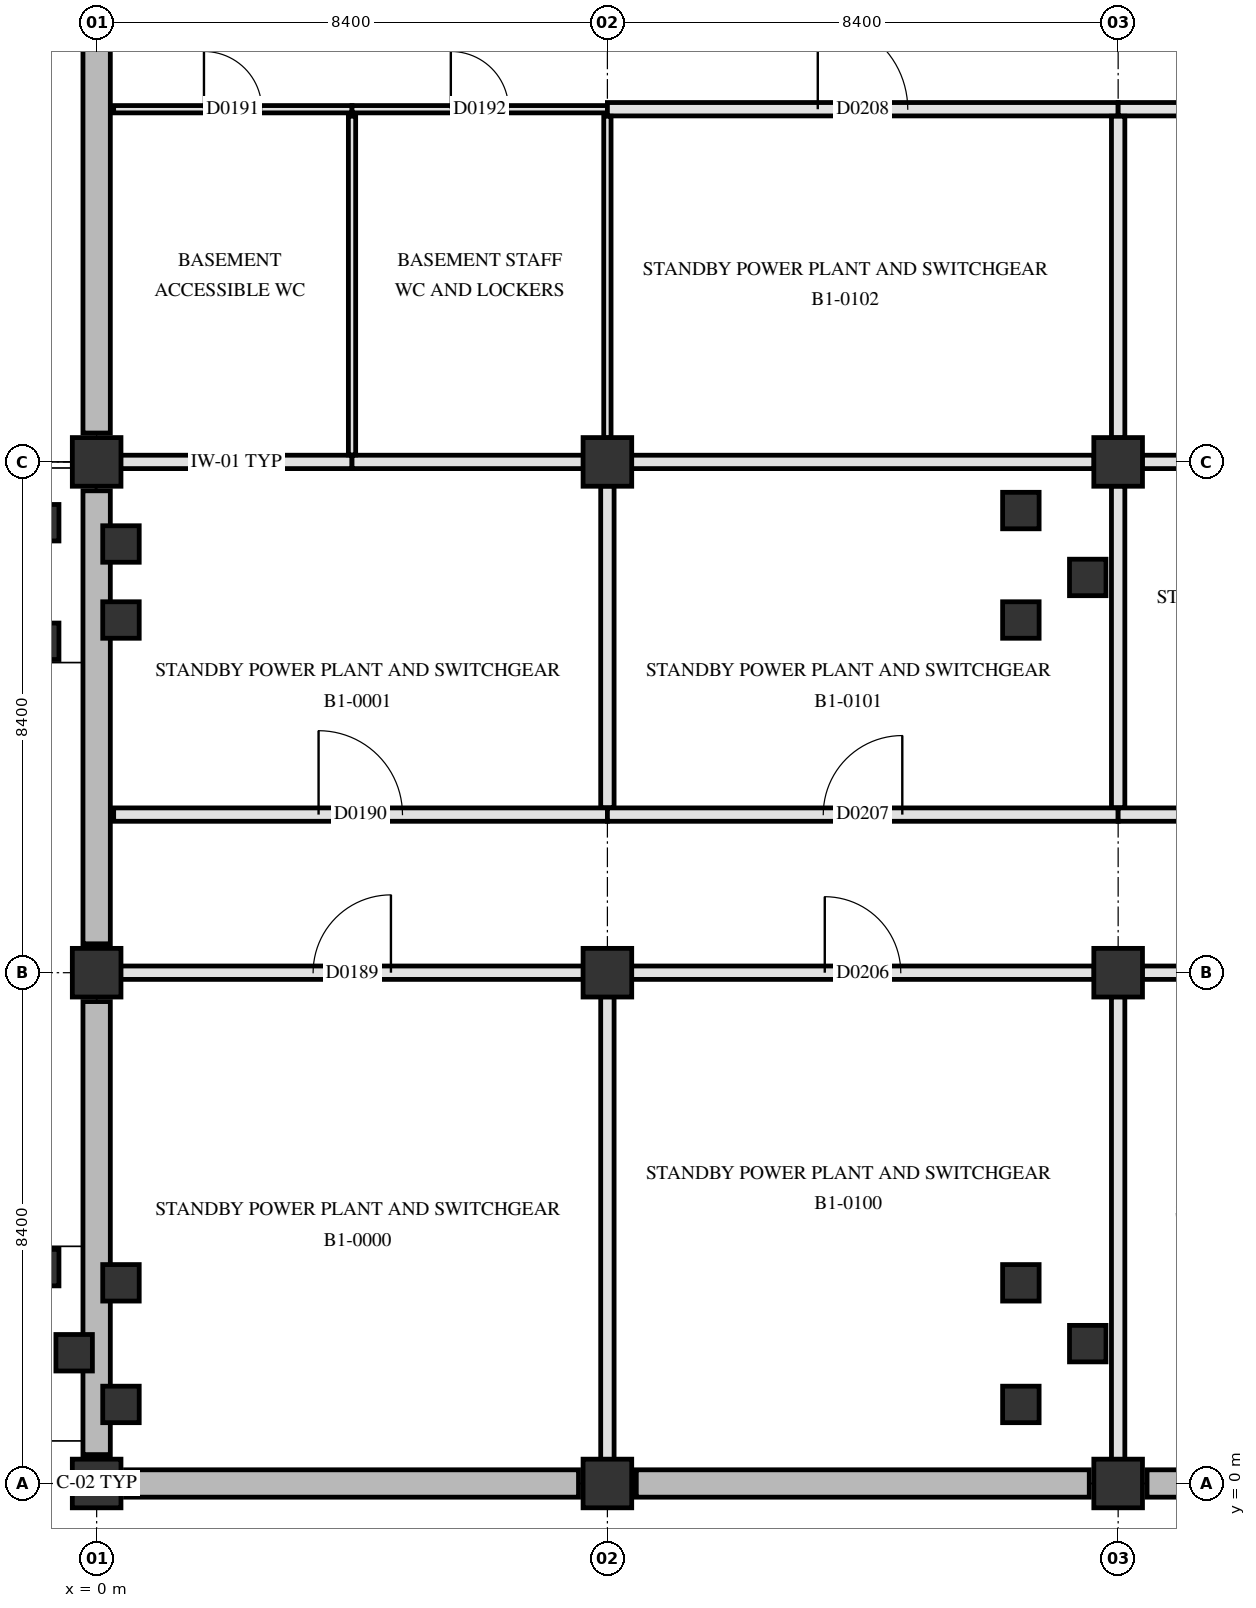
"""IFC4 building model, lengths in metres.
Left out: names, types, materials, properties, quantities, classifications, styles, units other than length and angle.
Written with IfcOpenShell. Run it as: python <this file> out.ifc"""

import sys

from ifc_helpers import new_model, si_unit, direction, frame, frame_2d, origin, origin_2d, place, context, subcontext, project, spatial, rectangle, extrude, element, fill, save


model = new_model("IFC4")
c1 = context("Model", 3, precision=1e-05, world=origin(), true_north=direction((0.0, 1.0)))
c2 = subcontext(c1, "Body", "Model", "MODEL_VIEW")
j1 = project(units=[si_unit("LENGTHUNIT", "METRE"), si_unit("PLANEANGLEUNIT", "RADIAN")], contexts=[c1])
p1 = place(None, origin())
s1 = spatial("IfcSite", under=j1, at=p1, CompositionType="ELEMENT")
p2 = place(p1, origin())
s2 = spatial("IfcBuilding", under=s1, at=p2, CompositionType="ELEMENT")
p3 = place(p2, frame((0.0, 0.0, -5.4)))
s3 = spatial("IfcBuildingStorey", under=s2, at=p3, CompositionType="ELEMENT", Elevation=-5.4)
for number, where, z_axis, x_axis in (
    (1, (0.0, 0.0, 0.0), (0.0, 0.0, 1.0), (1.0, 0.0, 0.0)),
    (2, (0.0, 8.4, 0.0), (0.0, 0.0, 1.0), (1.0, 0.0, 0.0)),
    (3, (0.0, 16.8, 0.0), (0.0, 0.0, 1.0), (1.0, 0.0, 0.0)),
    (4, (8.4, 0.0, 0.0), (0.0, 0.0, 1.0), (1.0, 0.0, 0.0)),
    (5, (8.4, 8.4, 0.0), (0.0, 0.0, 1.0), (1.0, 0.0, 0.0)),
    (6, (8.4, 16.8, 0.0), (0.0, 0.0, 1.0), (1.0, 0.0, 0.0)),
    (7, (16.8, 0.0, 0.0), (0.0, 0.0, 1.0), (1.0, 0.0, 0.0)),
    (8, (16.8, 8.4, 0.0), (0.0, 0.0, 1.0), (1.0, 0.0, 0.0)),
    (9, (16.8, 16.8, 0.0), (0.0, 0.0, 1.0), (1.0, 0.0, 0.0)),
):
    element("IfcColumn", number, at=place(p3, frame(where, z_axis=z_axis, x_axis=x_axis)), inside=s3, PredefinedType="COLUMN", context=c2, shape_type="SweptSolid", body=[
        extrude(rectangle(XDim=0.8, YDim=0.8, at=origin_2d()), origin(), (0.0, 0.0, 1.0), 5.4),
    ])
p4 = place(p3, frame((24.725, 0.0, 0.0), z_axis=(0.0, 0.0, 1.0), x_axis=(-1.0, 0.0, 0.0)))
e10 = element("IfcWall", 10, at=p4, inside=s3, PredefinedType="SOLIDWALL", context=c2, shape_type="SweptSolid", body=[
    extrude(rectangle(XDim=7.45, YDim=0.45, at=frame_2d((3.725, 0.0))), origin(), (0.0, 0.0, 1.0), 5.08),
])
for number, where, z_axis, x_axis in (
    (11, (16.325, 0.0, 0.0), (0.0, 0.0, 1.0), (-1.0, 0.0, 0.0)),
    (12, (7.925, 0.0, 0.0), (0.0, 0.0, 1.0), (-1.0, 0.0, 0.0)),
    (13, (0.0, 0.475, 0.0), (0.0, 0.0, 1.0), (0.0, 1.0, 0.0)),
    (14, (0.0, 8.875, 0.0), (0.0, 0.0, 1.0), (0.0, 1.0, 0.0)),
):
    element("IfcWall", number, at=place(p3, frame(where, z_axis=z_axis, x_axis=x_axis)), inside=s3, PredefinedType="SOLIDWALL", context=c2, shape_type="SweptSolid", body=[
        extrude(rectangle(XDim=7.45, YDim=0.45, at=frame_2d((3.725, 0.0))), origin(), (0.0, 0.0, 1.0), 5.08),
    ])
p5 = place(p3, frame((0.0, 17.275, 0.0), z_axis=(0.0, 0.0, 1.0), x_axis=(0.0, 1.0, 0.0)))
e15 = element("IfcWall", 15, at=p5, inside=s3, PredefinedType="SOLIDWALL", context=c2, shape_type="SweptSolid", body=[
    extrude(rectangle(XDim=7.45, YDim=0.45, at=frame_2d((3.725, 0.0))), origin(), (0.0, 0.0, 1.0), 5.08),
])
for number, where, z_axis, x_axis in (
    (16, (0.4, 1.3, 0.0), (0.0, 0.0, 1.0), (1.0, 0.0, 0.0)),
    (17, (15.2, 1.3, 0.0), (0.0, 0.0, 1.0), (1.0, 0.0, 0.0)),
    (18, (15.2, 3.3, 0.0), (0.0, 0.0, 1.0), (1.0, 0.0, 0.0)),
    (19, (0.4, 3.3, 0.0), (0.0, 0.0, 1.0), (1.0, 0.0, 0.0)),
):
    element("IfcColumn", number, at=place(p3, frame(where, z_axis=z_axis, x_axis=x_axis)), inside=s3, PredefinedType="COLUMN", context=c2, shape_type="SweptSolid", body=[
        extrude(rectangle(XDim=0.6, YDim=0.6, at=origin_2d()), origin(), (0.0, 0.0, 1.0), 4.0),
    ])
p6 = place(p3, frame((16.3, 2.3, 0.0), z_axis=(0.0, 0.0, 1.0), x_axis=(1.0, 0.0, 0.0)))
e20 = element("IfcColumn", 20, at=p6, inside=s3, PredefinedType="COLUMN", context=c2, shape_type="SweptSolid", body=[
    extrude(rectangle(XDim=0.6, YDim=0.6, at=origin_2d()), origin(), (0.0, 0.0, 1.0), 5.09),
])
for number, where, z_axis, x_axis in (
    (21, (-0.37, 2.15, 2.75), (0.0, 0.0, 1.0), (1.0, 0.0, 0.0)),
    (22, (-0.92, 3.55, 2.75), (0.0, 0.0, 1.0), (1.0, 0.0, 0.0)),
):
    element("IfcColumn", number, at=place(p3, frame(where, z_axis=z_axis, x_axis=x_axis)), inside=s3, PredefinedType="COLUMN", context=c2, shape_type="SweptSolid", body=[
        extrude(rectangle(XDim=0.6, YDim=0.6, at=origin_2d()), origin(), (0.0, 0.0, 1.0), 0.85),
    ])
for number, where, z_axis, x_axis in (
    (23, (0.4, 14.2, 0.0), (0.0, 0.0, 1.0), (1.0, 0.0, 0.0)),
    (24, (15.2, 14.2, 0.0), (0.0, 0.0, 1.0), (1.0, 0.0, 0.0)),
    (25, (15.2, 16.0, 0.0), (0.0, 0.0, 1.0), (1.0, 0.0, 0.0)),
    (26, (0.4, 15.45, 0.0), (0.0, 0.0, 1.0), (1.0, 0.0, 0.0)),
):
    element("IfcColumn", number, at=place(p3, frame(where, z_axis=z_axis, x_axis=x_axis)), inside=s3, PredefinedType="COLUMN", context=c2, shape_type="SweptSolid", body=[
        extrude(rectangle(XDim=0.6, YDim=0.6, at=origin_2d()), origin(), (0.0, 0.0, 1.0), 4.0),
    ])
p7 = place(p3, frame((16.3, 14.9, 0.0), z_axis=(0.0, 0.0, 1.0), x_axis=(1.0, 0.0, 0.0)))
e27 = element("IfcColumn", 27, at=p7, inside=s3, PredefinedType="COLUMN", context=c2, shape_type="SweptSolid", body=[
    extrude(rectangle(XDim=0.6, YDim=0.6, at=origin_2d()), origin(), (0.0, 0.0, 1.0), 5.09),
])
for number, where, z_axis, x_axis in (
    (28, (-0.92, 13.85, 2.75), (0.0, 0.0, 1.0), (1.0, 0.0, 0.0)),
    (29, (-0.92, 15.8, 2.75), (0.0, 0.0, 1.0), (1.0, 0.0, 0.0)),
):
    element("IfcColumn", number, at=place(p3, frame(where, z_axis=z_axis, x_axis=x_axis)), inside=s3, PredefinedType="COLUMN", context=c2, shape_type="SweptSolid", body=[
        extrude(rectangle(XDim=0.6, YDim=0.6, at=origin_2d()), origin(), (0.0, 0.0, 1.0), 0.85),
    ])
p8 = place(p3, frame((0.395, 8.4, 0.0), z_axis=(0.0, 0.0, 1.0), x_axis=(1.0, 0.0, 0.0)))
e30 = element("IfcWall", 30, at=p8, inside=s3, PredefinedType="PARTITIONING", context=c2, shape_type="SweptSolid", body=[
    extrude(rectangle(XDim=7.61, YDim=0.22, at=frame_2d((3.805, 0.0))), origin(), (0.0, 0.0, 1.0), 4.42),
])
p9 = place(p8, frame((3.165, 0.0, 0.0)))
e31 = element("IfcOpeningElement", 31, at=p9, cuts=e30, PredefinedType="OPENING", context=c2, shape_type="SweptSolid", body=[
    extrude(rectangle(XDim=1.28, YDim=2.18, at=frame_2d((0.64, 1.09))), frame((0.0, 0.12, 0.0), z_axis=(0.0, -1.0, 0.0), x_axis=(1.0, 0.0, 0.0)), (0.0, 0.0, 1.0), 0.24),
])
p10 = place(p3, frame((8.795, 8.4, 0.0), z_axis=(0.0, 0.0, 1.0), x_axis=(1.0, 0.0, 0.0)))
e32 = element("IfcWall", 32, at=p10, inside=s3, PredefinedType="PARTITIONING", context=c2, shape_type="SweptSolid", body=[
    extrude(rectangle(XDim=7.61, YDim=0.22, at=frame_2d((3.805, 0.0))), origin(), (0.0, 0.0, 1.0), 4.42),
])
p11 = place(p10, frame((3.18, 0.0, 0.0)))
e33 = element("IfcOpeningElement", 33, at=p11, cuts=e32, PredefinedType="OPENING", context=c2, shape_type="SweptSolid", body=[
    extrude(rectangle(XDim=1.25, YDim=2.2, at=frame_2d((0.625, 1.1))), frame((0.0, 0.12, 0.0), z_axis=(0.0, -1.0, 0.0), x_axis=(1.0, 0.0, 0.0)), (0.0, 0.0, 1.0), 0.24),
])
p12 = place(p3, frame((17.195, 8.4, 0.0), z_axis=(0.0, 0.0, 1.0), x_axis=(1.0, 0.0, 0.0)))
e34 = element("IfcWall", 34, at=p12, inside=s3, PredefinedType="PARTITIONING", context=c2, shape_type="SweptSolid", body=[
    extrude(rectangle(XDim=7.61, YDim=0.22, at=frame_2d((3.805, 0.0))), origin(), (0.0, 0.0, 1.0), 4.42),
])
p13 = place(p12, frame((3.115, 0.0, 0.0)))
e35 = element("IfcOpeningElement", 35, at=p13, cuts=e34, PredefinedType="OPENING", context=c2, shape_type="SweptSolid", body=[
    extrude(rectangle(XDim=1.38, YDim=2.22, at=frame_2d((0.69, 1.11))), frame((0.0, 0.12, 0.0), z_axis=(0.0, -1.0, 0.0), x_axis=(1.0, 0.0, 0.0)), (0.0, 0.0, 1.0), 0.24),
])
p14 = place(p3, frame((0.28, 11.0, 0.0), z_axis=(0.0, 0.0, 1.0), x_axis=(1.0, 0.0, 0.0)))
e36 = element("IfcWall", 36, at=p14, inside=s3, PredefinedType="PARTITIONING", context=c2, shape_type="SweptSolid", body=[
    extrude(rectangle(XDim=8.12, YDim=0.22, at=frame_2d((4.06, 0.0))), origin(), (0.0, 0.0, 1.0), 4.47),
])
p15 = place(p14, frame((3.37, 0.0, 0.0)))
e37 = element("IfcOpeningElement", 37, at=p15, cuts=e36, PredefinedType="OPENING", context=c2, shape_type="SweptSolid", body=[
    extrude(rectangle(XDim=1.38, YDim=2.22, at=frame_2d((0.69, 1.11))), frame((0.0, 0.12, 0.0), z_axis=(0.0, -1.0, 0.0), x_axis=(1.0, 0.0, 0.0)), (0.0, 0.0, 1.0), 0.24),
])
p16 = place(p3, frame((8.4, 11.0, 0.0), z_axis=(0.0, 0.0, 1.0), x_axis=(1.0, 0.0, 0.0)))
e38 = element("IfcWall", 38, at=p16, inside=s3, PredefinedType="PARTITIONING", context=c2, shape_type="SweptSolid", body=[
    extrude(rectangle(XDim=8.4, YDim=0.22, at=frame_2d((4.2, 0.0))), origin(), (0.0, 0.0, 1.0), 4.47),
])
p17 = place(p16, frame((3.55, 0.0, 0.0)))
e39 = element("IfcOpeningElement", 39, at=p17, cuts=e38, PredefinedType="OPENING", context=c2, shape_type="SweptSolid", body=[
    extrude(rectangle(XDim=1.3, YDim=2.2, at=frame_2d((0.65, 1.1))), frame((0.0, 0.12, 0.0), z_axis=(0.0, -1.0, 0.0), x_axis=(1.0, 0.0, 0.0)), (0.0, 0.0, 1.0), 0.24),
])
p18 = place(p3, frame((16.8, 11.0, 0.0), z_axis=(0.0, 0.0, 1.0), x_axis=(1.0, 0.0, 0.0)))
e40 = element("IfcWall", 40, at=p18, inside=s3, PredefinedType="PARTITIONING", context=c2, shape_type="SweptSolid", body=[
    extrude(rectangle(XDim=8.4, YDim=0.22, at=frame_2d((4.2, 0.0))), origin(), (0.0, 0.0, 1.0), 4.47),
])
p19 = place(p18, frame((3.49, 0.0, 0.0)))
e41 = element("IfcOpeningElement", 41, at=p19, cuts=e40, PredefinedType="OPENING", context=c2, shape_type="SweptSolid", body=[
    extrude(rectangle(XDim=1.42, YDim=2.22, at=frame_2d((0.71, 1.11))), frame((0.0, 0.12, 0.0), z_axis=(0.0, -1.0, 0.0), x_axis=(1.0, 0.0, 0.0)), (0.0, 0.0, 1.0), 0.24),
])
for number, where, z_axis, x_axis in (
    (42, (0.395, 16.8, 0.0), (0.0, 0.0, 1.0), (1.0, 0.0, 0.0)),
    (43, (4.2, 16.8, 0.0), (0.0, 0.0, 1.0), (1.0, 0.0, 0.0)),
):
    element("IfcWall", number, at=place(p3, frame(where, z_axis=z_axis, x_axis=x_axis)), inside=s3, PredefinedType="PARTITIONING", context=c2, shape_type="SweptSolid", body=[
        extrude(rectangle(XDim=3.805, YDim=0.22, at=frame_2d((1.902, 0.0))), origin(), (0.0, 0.0, 1.0), 4.42),
    ])
p20 = place(p3, frame((8.795, 16.8, 0.0), z_axis=(0.0, 0.0, 1.0), x_axis=(1.0, 0.0, 0.0)))
e44 = element("IfcWall", 44, at=p20, inside=s3, PredefinedType="PARTITIONING", context=c2, shape_type="SweptSolid", body=[
    extrude(rectangle(XDim=7.61, YDim=0.22, at=frame_2d((3.805, 0.0))), origin(), (0.0, 0.0, 1.0), 4.42),
])
p21 = place(p3, frame((17.195, 16.8, 0.0), z_axis=(0.0, 0.0, 1.0), x_axis=(1.0, 0.0, 0.0)))
e45 = element("IfcWall", 45, at=p21, inside=s3, PredefinedType="PARTITIONING", context=c2, shape_type="SweptSolid", body=[
    extrude(rectangle(XDim=7.61, YDim=0.22, at=frame_2d((3.805, 0.0))), origin(), (0.0, 0.0, 1.0), 4.42),
])
p22 = place(p3, frame((0.28, 22.6, 0.0), z_axis=(0.0, 0.0, 1.0), x_axis=(1.0, 0.0, 0.0)))
e46 = element("IfcWall", 46, at=p22, inside=s3, PredefinedType="PARTITIONING", context=c2, shape_type="SweptSolid", body=[
    extrude(rectangle(XDim=3.92, YDim=0.12, at=frame_2d((1.96, 0.0))), origin(), (0.0, 0.0, 1.0), 5.07),
])
p23 = place(p22, frame((1.485, 0.0, 0.0)))
e47 = element("IfcOpeningElement", 47, at=p23, cuts=e46, PredefinedType="OPENING", context=c2, shape_type="SweptSolid", body=[
    extrude(rectangle(XDim=0.95, YDim=2.1, at=frame_2d((0.475, 1.05))), frame((0.0, 0.07, 0.0), z_axis=(0.0, -1.0, 0.0), x_axis=(1.0, 0.0, 0.0)), (0.0, 0.0, 1.0), 0.14),
])
p24 = place(p3, frame((4.2, 22.6, 0.0), z_axis=(0.0, 0.0, 1.0), x_axis=(1.0, 0.0, 0.0)))
e48 = element("IfcWall", 48, at=p24, inside=s3, PredefinedType="PARTITIONING", context=c2, shape_type="SweptSolid", body=[
    extrude(rectangle(XDim=4.2, YDim=0.12, at=frame_2d((2.1, 0.0))), origin(), (0.0, 0.0, 1.0), 4.47),
])
p25 = place(p24, frame((1.625, 0.0, 0.0)))
e49 = element("IfcOpeningElement", 49, at=p25, cuts=e48, PredefinedType="OPENING", context=c2, shape_type="SweptSolid", body=[
    extrude(rectangle(XDim=0.95, YDim=2.1, at=frame_2d((0.475, 1.05))), frame((0.0, 0.07, 0.0), z_axis=(0.0, -1.0, 0.0), x_axis=(1.0, 0.0, 0.0)), (0.0, 0.0, 1.0), 0.14),
])
p26 = place(p3, frame((8.4, 22.6, 0.0), z_axis=(0.0, 0.0, 1.0), x_axis=(1.0, 0.0, 0.0)))
e50 = element("IfcWall", 50, at=p26, inside=s3, PredefinedType="PARTITIONING", context=c2, shape_type="SweptSolid", body=[
    extrude(rectangle(XDim=8.4, YDim=0.22, at=frame_2d((4.2, 0.0))), origin(), (0.0, 0.0, 1.0), 4.47),
])
p27 = place(p26, frame((3.46, 0.0, 0.0)))
e51 = element("IfcOpeningElement", 51, at=p27, cuts=e50, PredefinedType="OPENING", context=c2, shape_type="SweptSolid", body=[
    extrude(rectangle(XDim=1.48, YDim=2.22, at=frame_2d((0.74, 1.11))), frame((0.0, 0.12, 0.0), z_axis=(0.0, -1.0, 0.0), x_axis=(1.0, 0.0, 0.0)), (0.0, 0.0, 1.0), 0.24),
])
p28 = place(p3, frame((16.8, 22.6, 0.0), z_axis=(0.0, 0.0, 1.0), x_axis=(1.0, 0.0, 0.0)))
e52 = element("IfcWall", 52, at=p28, inside=s3, PredefinedType="PARTITIONING", context=c2, shape_type="SweptSolid", body=[
    extrude(rectangle(XDim=5.95, YDim=0.22, at=frame_2d((2.975, 0.0))), origin(), (0.0, 0.0, 1.0), 4.47),
])
p29 = place(p28, frame((2.185, 0.0, 0.0)))
e53 = element("IfcOpeningElement", 53, at=p29, cuts=e52, PredefinedType="OPENING", context=c2, shape_type="SweptSolid", body=[
    extrude(rectangle(XDim=1.58, YDim=2.22, at=frame_2d((0.79, 1.11))), frame((0.0, 0.12, 0.0), z_axis=(0.0, -1.0, 0.0), x_axis=(1.0, 0.0, 0.0)), (0.0, 0.0, 1.0), 0.24),
])
p30 = place(p3, frame((4.2, 16.915, 0.0), z_axis=(0.0, 0.0, 1.0), x_axis=(0.0, 1.0, 0.0)))
e54 = element("IfcWall", 54, at=p30, inside=s3, PredefinedType="PARTITIONING", context=c2, shape_type="SweptSolid", body=[
    extrude(rectangle(XDim=5.57, YDim=0.12, at=frame_2d((2.785, 0.0))), origin(), (0.0, 0.0, 1.0), 4.42),
])
p31 = place(p3, frame((8.4, 0.395, 0.0), z_axis=(0.0, 0.0, 1.0), x_axis=(0.0, 1.0, 0.0)))
e55 = element("IfcWall", 55, at=p31, inside=s3, PredefinedType="PARTITIONING", context=c2, shape_type="SweptSolid", body=[
    extrude(rectangle(XDim=7.61, YDim=0.22, at=frame_2d((3.805, 0.0))), origin(), (0.0, 0.0, 1.0), 4.47),
])
p32 = place(p3, frame((8.4, 11.115, 0.0), z_axis=(0.0, 0.0, 1.0), x_axis=(0.0, 1.0, 0.0)))
e56 = element("IfcWall", 56, at=p32, inside=s3, PredefinedType="PARTITIONING", context=c2, shape_type="SweptSolid", body=[
    extrude(rectangle(XDim=5.29, YDim=0.22, at=frame_2d((2.645, 0.0))), origin(), (0.0, 0.0, 1.0), 4.47),
])
p33 = place(p3, frame((8.4, 17.195, 0.0), z_axis=(0.0, 0.0, 1.0), x_axis=(0.0, 1.0, 0.0)))
e57 = element("IfcWall", 57, at=p33, inside=s3, PredefinedType="PARTITIONING", context=c2, shape_type="SweptSolid", body=[
    extrude(rectangle(XDim=5.29, YDim=0.12, at=frame_2d((2.645, 0.0))), origin(), (0.0, 0.0, 1.0), 4.47),
])
p34 = place(p3, frame((16.8, 0.395, 0.0), z_axis=(0.0, 0.0, 1.0), x_axis=(0.0, 1.0, 0.0)))
e58 = element("IfcWall", 58, at=p34, inside=s3, PredefinedType="PARTITIONING", context=c2, shape_type="SweptSolid", body=[
    extrude(rectangle(XDim=7.61, YDim=0.22, at=frame_2d((3.805, 0.0))), origin(), (0.0, 0.0, 1.0), 4.47),
])
for number, where, z_axis, x_axis in (
    (59, (16.8, 11.115, 0.0), (0.0, 0.0, 1.0), (0.0, 1.0, 0.0)),
    (60, (16.8, 17.195, 0.0), (0.0, 0.0, 1.0), (0.0, 1.0, 0.0)),
):
    element("IfcWall", number, at=place(p3, frame(where, z_axis=z_axis, x_axis=x_axis)), inside=s3, PredefinedType="PARTITIONING", context=c2, shape_type="SweptSolid", body=[
        extrude(rectangle(XDim=5.29, YDim=0.22, at=frame_2d((2.645, 0.0))), origin(), (0.0, 0.0, 1.0), 4.47),
    ])
p35 = place(p9, origin())
e61 = element("IfcDoor", 61, at=p35, inside=s3, OperationType="SINGLE_SWING_RIGHT", PredefinedType="DOOR", context=c2, shape_type="SweptSolid", body=[
    extrude(rectangle(XDim=1.28, YDim=2.18, at=frame_2d((0.64, 1.09))), frame((0.0, 0.025, 0.0), z_axis=(0.0, -1.0, 0.0), x_axis=(1.0, 0.0, 0.0)), (0.0, 0.0, 1.0), 0.05),
])
fill(e31, e61)
p36 = place(p15, origin())
e62 = element("IfcDoor", 62, at=p36, inside=s3, OperationType="SINGLE_SWING_LEFT", PredefinedType="DOOR", context=c2, shape_type="SweptSolid", body=[
    extrude(rectangle(XDim=1.38, YDim=2.22, at=frame_2d((0.69, 1.11))), frame((0.0, 0.025, 0.0), z_axis=(0.0, -1.0, 0.0), x_axis=(1.0, 0.0, 0.0)), (0.0, 0.0, 1.0), 0.05),
])
fill(e37, e62)
p37 = place(p23, origin())
e63 = element("IfcDoor", 63, at=p37, inside=s3, OperationType="SINGLE_SWING_LEFT", PredefinedType="DOOR", context=c2, shape_type="SweptSolid", body=[
    extrude(rectangle(XDim=0.95, YDim=2.1, at=frame_2d((0.475, 1.05))), frame((0.0, 0.025, 0.0), z_axis=(0.0, -1.0, 0.0), x_axis=(1.0, 0.0, 0.0)), (0.0, 0.0, 1.0), 0.05),
])
fill(e47, e63)
p38 = place(p25, origin())
e64 = element("IfcDoor", 64, at=p38, inside=s3, OperationType="SINGLE_SWING_LEFT", PredefinedType="DOOR", context=c2, shape_type="SweptSolid", body=[
    extrude(rectangle(XDim=0.95, YDim=2.1, at=frame_2d((0.475, 1.05))), frame((0.0, 0.025, 0.0), z_axis=(0.0, -1.0, 0.0), x_axis=(1.0, 0.0, 0.0)), (0.0, 0.0, 1.0), 0.05),
])
fill(e49, e64)
p39 = place(p11, origin())
e65 = element("IfcDoor", 65, at=p39, inside=s3, OperationType="SINGLE_SWING_LEFT", PredefinedType="DOOR", context=c2, shape_type="SweptSolid", body=[
    extrude(rectangle(XDim=1.25, YDim=2.2, at=frame_2d((0.625, 1.1))), frame((0.0, 0.025, 0.0), z_axis=(0.0, -1.0, 0.0), x_axis=(1.0, 0.0, 0.0)), (0.0, 0.0, 1.0), 0.05),
])
fill(e33, e65)
p40 = place(p17, origin())
e66 = element("IfcDoor", 66, at=p40, inside=s3, OperationType="SINGLE_SWING_RIGHT", PredefinedType="DOOR", context=c2, shape_type="SweptSolid", body=[
    extrude(rectangle(XDim=1.3, YDim=2.2, at=frame_2d((0.65, 1.1))), frame((0.0, 0.025, 0.0), z_axis=(0.0, -1.0, 0.0), x_axis=(1.0, 0.0, 0.0)), (0.0, 0.0, 1.0), 0.05),
])
fill(e39, e66)
p41 = place(p27, origin())
e67 = element("IfcDoor", 67, at=p41, inside=s3, OperationType="SINGLE_SWING_LEFT", PredefinedType="DOOR", context=c2, shape_type="SweptSolid", body=[
    extrude(rectangle(XDim=1.48, YDim=2.22, at=frame_2d((0.74, 1.11))), frame((0.0, 0.025, 0.0), z_axis=(0.0, -1.0, 0.0), x_axis=(1.0, 0.0, 0.0)), (0.0, 0.0, 1.0), 0.05),
])
fill(e51, e67)
save(model, sys.argv[1])
